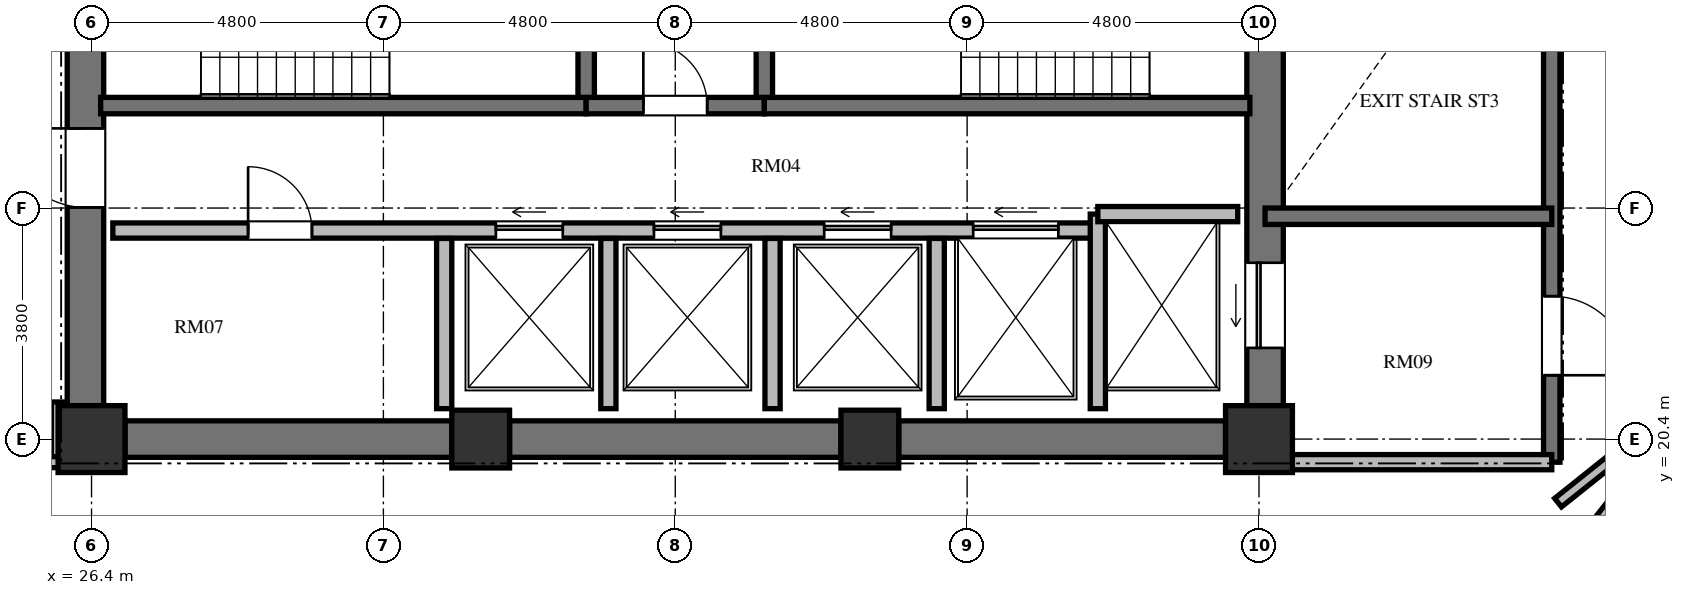
"""IFC4 building model, lengths in metres.
Left out: names, types, materials, properties, quantities, classifications, styles, units other than length and angle.
Written with IfcOpenShell. Run it as: python <this file> out.ifc"""

import sys

from ifc_helpers import new_model, si_unit, direction, frame, frame_2d, origin, origin_2d, place, context, subcontext, project, spatial, rectangle, extrude, element, fill, save


model = new_model("IFC4")
c1 = context("Model", 3, precision=1e-05, world=origin(), true_north=direction((0.0, 1.0)))
c2 = subcontext(c1, "Body", "Model", "MODEL_VIEW")
j1 = project(units=[si_unit("LENGTHUNIT", "METRE"), si_unit("PLANEANGLEUNIT", "RADIAN")], contexts=[c1])
p1 = place(None, origin())
s1 = spatial("IfcSite", under=j1, at=p1, CompositionType="ELEMENT")
p2 = place(p1, origin())
s2 = spatial("IfcBuilding", under=s1, at=p2, CompositionType="ELEMENT")
p3 = place(p2, frame((0.0, 0.0, 174.768)))
s3 = spatial("IfcBuildingStorey", under=s2, at=p3, CompositionType="ELEMENT", Elevation=174.768)
p4 = place(p3, frame((26.4, 20.4, 0.0), z_axis=(0.0, 0.0, 1.0), x_axis=(1.0, 0.0, 0.0)))
e1 = element("IfcColumn", 1, at=p4, inside=s3, PredefinedType="COLUMN", context=c2, shape_type="SweptSolid", body=[
    extrude(rectangle(XDim=1.1, YDim=1.1, at=origin_2d()), origin(), (0.0, 0.0, 1.0), 3.648),
])
for number, where, z_axis, x_axis in (
    (2, (32.8, 20.4, 0.0), (0.0, 0.0, 1.0), (1.0, 0.0, 0.0)),
    (3, (39.2, 20.4, 0.0), (0.0, 0.0, 1.0), (1.0, 0.0, 0.0)),
):
    element("IfcColumn", number, at=place(p3, frame(where, z_axis=z_axis, x_axis=x_axis)), inside=s3, PredefinedType="COLUMN", context=c2, shape_type="SweptSolid", body=[
        extrude(rectangle(XDim=0.95, YDim=0.95, at=origin_2d()), origin(), (0.0, 0.0, 1.0), 3.648),
    ])
p5 = place(p3, frame((45.6, 20.4, 0.0), z_axis=(0.0, 0.0, 1.0), x_axis=(1.0, 0.0, 0.0)))
e4 = element("IfcColumn", 4, at=p5, inside=s3, PredefinedType="COLUMN", context=c2, shape_type="SweptSolid", body=[
    extrude(rectangle(XDim=1.1, YDim=1.1, at=origin_2d()), origin(), (0.0, 0.0, 1.0), 3.648),
])
p6 = place(p3, frame((26.3, 20.95, 0.0), z_axis=(0.0, 0.0, 1.0), x_axis=(0.0, 1.0, 0.0)))
e5 = element("IfcWall", 5, at=p6, inside=s3, PredefinedType="SHEAR", context=c2, shape_type="SweptSolid", body=[
    extrude(rectangle(XDim=14.1, YDim=0.6, at=frame_2d((7.05, 0.0))), origin(), (0.0, 0.0, 1.0), 3.648),
])
p7 = place(p6, frame((6.5, 0.0, 0.0)))
e6 = element("IfcOpeningElement", 6, at=p7, cuts=e5, PredefinedType="OPENING", context=c2, shape_type="SweptSolid", body=[
    extrude(rectangle(XDim=1.2, YDim=2.15, at=frame_2d((0.6, 1.075))), frame((0.0, 0.31, 0.0), z_axis=(0.0, -1.0, 0.0), x_axis=(1.0, 0.0, 0.0)), (0.0, 0.0, 1.0), 0.62),
])
p8 = place(p6, frame((9.6, 0.0, 0.0)))
e7 = element("IfcOpeningElement", 7, at=p8, cuts=e5, PredefinedType="OPENING", context=c2, shape_type="SweptSolid", body=[
    extrude(rectangle(XDim=1.3, YDim=2.2, at=frame_2d((0.65, 1.1))), frame((0.0, 0.31, 0.0), z_axis=(0.0, -1.0, 0.0), x_axis=(1.0, 0.0, 0.0)), (0.0, 0.0, 1.0), 0.62),
])
p9 = place(p6, frame((3.26, 0.0, 0.0)))
e8 = element("IfcOpeningElement", 8, at=p9, cuts=e5, PredefinedType="OPENING", context=c2, shape_type="SweptSolid", body=[
    extrude(rectangle(XDim=1.3, YDim=2.2, at=frame_2d((0.65, 1.1))), frame((0.0, 0.31, 0.0), z_axis=(0.0, -1.0, 0.0), x_axis=(1.0, 0.0, 0.0)), (0.0, 0.0, 1.0), 0.62),
])
p10 = place(p3, frame((45.7, 20.95, 0.0), z_axis=(0.0, 0.0, 1.0), x_axis=(0.0, 1.0, 0.0)))
e9 = element("IfcWall", 9, at=p10, inside=s3, PredefinedType="SHEAR", context=c2, shape_type="SweptSolid", body=[
    extrude(rectangle(XDim=14.1, YDim=0.6, at=frame_2d((7.05, 0.0))), origin(), (0.0, 0.0, 1.0), 3.648),
])
p11 = place(p10, frame((11.75, 0.0, 0.0)))
e10 = element("IfcOpeningElement", 10, at=p11, cuts=e9, PredefinedType="OPENING", context=c2, shape_type="SweptSolid", body=[
    extrude(rectangle(XDim=1.4, YDim=2.3, at=frame_2d((0.7, 1.15))), frame((0.0, 0.31, 0.0), z_axis=(0.0, -1.0, 0.0), x_axis=(1.0, 0.0, 0.0)), (0.0, 0.0, 1.0), 0.62),
])
p12 = place(p10, frame((0.95, 0.0, 0.0)))
e11 = element("IfcOpeningElement", 11, at=p12, cuts=e9, PredefinedType="OPENING", context=c2, shape_type="SweptSolid", body=[
    extrude(rectangle(XDim=1.4, YDim=2.3, at=frame_2d((0.7, 1.15))), frame((0.0, 0.31, 0.0), z_axis=(0.0, -1.0, 0.0), x_axis=(1.0, 0.0, 0.0)), (0.0, 0.0, 1.0), 0.62),
])
p13 = place(p3, frame((26.95, 20.4, 0.0), z_axis=(0.0, 0.0, 1.0), x_axis=(1.0, 0.0, 0.0)))
e12 = element("IfcWall", 12, at=p13, inside=s3, PredefinedType="SHEAR", context=c2, shape_type="SweptSolid", body=[
    extrude(rectangle(XDim=5.375, YDim=0.6, at=frame_2d((2.688, 0.0))), origin(), (0.0, 0.0, 1.0), 3.648),
])
p14 = place(p3, frame((33.275, 20.4, 0.0), z_axis=(0.0, 0.0, 1.0), x_axis=(1.0, 0.0, 0.0)))
e13 = element("IfcWall", 13, at=p14, inside=s3, PredefinedType="SHEAR", context=c2, shape_type="SweptSolid", body=[
    extrude(rectangle(XDim=5.45, YDim=0.6, at=frame_2d((2.725, 0.0))), origin(), (0.0, 0.0, 1.0), 3.648),
])
p15 = place(p3, frame((39.675, 20.4, 0.0), z_axis=(0.0, 0.0, 1.0), x_axis=(1.0, 0.0, 0.0)))
e14 = element("IfcWall", 14, at=p15, inside=s3, PredefinedType="SHEAR", context=c2, shape_type="SweptSolid", body=[
    extrude(rectangle(XDim=5.375, YDim=0.6, at=frame_2d((2.688, 0.0))), origin(), (0.0, 0.0, 1.0), 3.648),
])
p16 = place(p3, frame((26.55, 25.885, 0.0), z_axis=(0.0, 0.0, 1.0), x_axis=(1.0, 0.0, 0.0)))
e15 = element("IfcWall", 15, at=p16, inside=s3, PredefinedType="SHEAR", context=c2, shape_type="SweptSolid", body=[
    extrude(rectangle(XDim=7.985, YDim=0.27, at=frame_2d((3.992, 0.0))), origin(), (0.0, 0.0, 1.0), 3.648),
])
p17 = place(p3, frame((34.535, 25.885, 0.0), z_axis=(0.0, 0.0, 1.0), x_axis=(1.0, 0.0, 0.0)))
e16 = element("IfcWall", 16, at=p17, inside=s3, PredefinedType="SHEAR", context=c2, shape_type="SweptSolid", body=[
    extrude(rectangle(XDim=2.93, YDim=0.27, at=frame_2d((1.465, 0.0))), origin(), (0.0, 0.0, 1.0), 3.648),
])
p18 = place(p17, frame((0.94, 0.0, 0.0)))
e17 = element("IfcOpeningElement", 17, at=p18, cuts=e16, PredefinedType="OPENING", context=c2, shape_type="SweptSolid", body=[
    extrude(rectangle(XDim=1.05, YDim=2.15, at=frame_2d((0.525, 1.075))), frame((0.0, 0.145, 0.0), z_axis=(0.0, -1.0, 0.0), x_axis=(1.0, 0.0, 0.0)), (0.0, 0.0, 1.0), 0.29),
])
p19 = place(p3, frame((37.465, 25.885, 0.0), z_axis=(0.0, 0.0, 1.0), x_axis=(1.0, 0.0, 0.0)))
e18 = element("IfcWall", 18, at=p19, inside=s3, PredefinedType="SHEAR", context=c2, shape_type="SweptSolid", body=[
    extrude(rectangle(XDim=7.985, YDim=0.27, at=frame_2d((3.992, 0.0))), origin(), (0.0, 0.0, 1.0), 3.648),
])
for number, where, z_axis, x_axis in (
    (19, (34.535, 26.02, 0.0), (0.0, 0.0, 1.0), (0.0, 1.0, 0.0)),
    (20, (37.465, 26.02, 0.0), (0.0, 0.0, 1.0), (0.0, 1.0, 0.0)),
):
    element("IfcWall", number, at=place(p3, frame(where, z_axis=z_axis, x_axis=x_axis)), inside=s3, PredefinedType="SHEAR", context=c2, shape_type="SweptSolid", body=[
        extrude(rectangle(XDim=4.08, YDim=0.27, at=frame_2d((2.04, 0.0))), origin(), (0.0, 0.0, 1.0), 3.648),
    ])
p20 = place(p3, frame((26.75, 23.83, 0.0), z_axis=(0.0, 0.0, 1.0), x_axis=(1.0, 0.0, 0.0)))
e21 = element("IfcWall", 21, at=p20, inside=s3, PredefinedType="SOLIDWALL", context=c2, shape_type="SweptSolid", body=[
    extrude(rectangle(XDim=16.2, YDim=0.25, at=frame_2d((8.1, 0.0))), origin(), (0.0, 0.0, 1.0), 3.428),
])
p21 = place(p20, frame((2.225, 0.0, 0.0)))
e22 = element("IfcOpeningElement", 22, at=p21, cuts=e21, PredefinedType="OPENING", context=c2, shape_type="SweptSolid", body=[
    extrude(rectangle(XDim=1.05, YDim=2.15, at=frame_2d((0.525, 1.075))), frame((0.0, 0.135, 0.0), z_axis=(0.0, -1.0, 0.0), x_axis=(1.0, 0.0, 0.0)), (0.0, 0.0, 1.0), 0.27),
])
p22 = place(p20, frame((6.3, 0.0, 0.0)))
e23 = element("IfcOpeningElement", 23, at=p22, cuts=e21, PredefinedType="OPENING", context=c2, shape_type="SweptSolid", body=[
    extrude(rectangle(XDim=1.1, YDim=2.2, at=frame_2d((0.55, 1.1))), frame((0.0, 0.135, 0.0), z_axis=(0.0, -1.0, 0.0), x_axis=(1.0, 0.0, 0.0)), (0.0, 0.0, 1.0), 0.27),
])
p23 = place(p20, frame((8.9, 0.0, 0.0)))
e24 = element("IfcOpeningElement", 24, at=p23, cuts=e21, PredefinedType="OPENING", context=c2, shape_type="SweptSolid", body=[
    extrude(rectangle(XDim=1.1, YDim=2.2, at=frame_2d((0.55, 1.1))), frame((0.0, 0.135, 0.0), z_axis=(0.0, -1.0, 0.0), x_axis=(1.0, 0.0, 0.0)), (0.0, 0.0, 1.0), 0.27),
])
p24 = place(p20, frame((11.7, 0.0, 0.0)))
e25 = element("IfcOpeningElement", 25, at=p24, cuts=e21, PredefinedType="OPENING", context=c2, shape_type="SweptSolid", body=[
    extrude(rectangle(XDim=1.1, YDim=2.2, at=frame_2d((0.55, 1.1))), frame((0.0, 0.135, 0.0), z_axis=(0.0, -1.0, 0.0), x_axis=(1.0, 0.0, 0.0)), (0.0, 0.0, 1.0), 0.27),
])
p25 = place(p20, frame((14.15, 0.0, 0.0)))
e26 = element("IfcOpeningElement", 26, at=p25, cuts=e21, PredefinedType="OPENING", context=c2, shape_type="SweptSolid", body=[
    extrude(rectangle(XDim=1.4, YDim=2.3, at=frame_2d((0.7, 1.15))), frame((0.0, 0.135, 0.0), z_axis=(0.0, -1.0, 0.0), x_axis=(1.0, 0.0, 0.0)), (0.0, 0.0, 1.0), 0.27),
])
p26 = place(p3, frame((42.95, 20.9, 0.0), z_axis=(0.0, 0.0, 1.0), x_axis=(0.0, 1.0, 0.0)))
e27 = element("IfcWall", 27, at=p26, inside=s3, PredefinedType="SOLIDWALL", context=c2, shape_type="SweptSolid", body=[
    extrude(rectangle(XDim=3.2, YDim=0.25, at=frame_2d((1.6, 0.0))), origin(), (0.0, 0.0, 1.0), 3.428),
])
p27 = place(p3, frame((42.95, 24.1, 0.0), z_axis=(0.0, 0.0, 1.0), x_axis=(1.0, 0.0, 0.0)))
e28 = element("IfcWall", 28, at=p27, inside=s3, PredefinedType="SOLIDWALL", context=c2, shape_type="SweptSolid", body=[
    extrude(rectangle(XDim=2.3, YDim=0.25, at=frame_2d((1.15, 0.0))), origin(), (0.0, 0.0, 1.0), 3.428),
])
for number, where, z_axis, x_axis in (
    (29, (32.2, 20.9, 0.0), (0.0, 0.0, 1.0), (0.0, 1.0, 0.0)),
    (30, (34.9, 20.9, 0.0), (0.0, 0.0, 1.0), (0.0, 1.0, 0.0)),
    (31, (37.6, 20.9, 0.0), (0.0, 0.0, 1.0), (0.0, 1.0, 0.0)),
    (32, (40.3, 20.9, 0.0), (0.0, 0.0, 1.0), (0.0, 1.0, 0.0)),
):
    element("IfcWall", number, at=place(p3, frame(where, z_axis=z_axis, x_axis=x_axis)), inside=s3, PredefinedType="SOLIDWALL", context=c2, shape_type="SweptSolid", body=[
        extrude(rectangle(XDim=2.8, YDim=0.25, at=frame_2d((1.4, 0.0))), origin(), (0.0, 0.0, 1.0), 3.428),
    ])
p28 = place(p3, frame((50.415, 35.845, 0.0), z_axis=(0.0, 0.0, 1.0), x_axis=(0.0, -1.0, 0.0)))
e33 = element("IfcWall", 33, at=p28, inside=s3, PredefinedType="SHEAR", context=c2, shape_type="SweptSolid", body=[
    extrude(rectangle(XDim=15.825, YDim=0.27, at=frame_2d((7.913, 0.0))), origin(), (0.0, 0.0, 1.0), 3.648),
])
p29 = place(p28, frame((4.445, 0.0, 0.0)))
e34 = element("IfcOpeningElement", 34, at=p29, cuts=e33, PredefinedType="OPENING", context=c2, shape_type="SweptSolid", body=[
    extrude(rectangle(XDim=1.2, YDim=2.15, at=frame_2d((0.6, 1.075))), frame((0.0, 0.145, 0.0), z_axis=(0.0, -1.0, 0.0), x_axis=(1.0, 0.0, 0.0)), (0.0, 0.0, 1.0), 0.29),
])
p30 = place(p28, frame((1.295, 0.0, 0.0)))
e35 = element("IfcOpeningElement", 35, at=p30, cuts=e33, PredefinedType="OPENING", context=c2, shape_type="SweptSolid", body=[
    extrude(rectangle(XDim=1.3, YDim=2.2, at=frame_2d((0.65, 1.1))), frame((0.0, 0.145, 0.0), z_axis=(0.0, -1.0, 0.0), x_axis=(1.0, 0.0, 0.0)), (0.0, 0.0, 1.0), 0.29),
])
p31 = place(p28, frame((13.095, 0.0, 0.0)))
e36 = element("IfcOpeningElement", 36, at=p31, cuts=e33, PredefinedType="OPENING", context=c2, shape_type="SweptSolid", body=[
    extrude(rectangle(XDim=1.3, YDim=2.2, at=frame_2d((0.65, 1.1))), frame((0.0, 0.145, 0.0), z_axis=(0.0, -1.0, 0.0), x_axis=(1.0, 0.0, 0.0)), (0.0, 0.0, 1.0), 0.29),
])
p32 = place(p3, frame((45.7, 24.065, 0.0), z_axis=(0.0, 0.0, 1.0), x_axis=(1.0, 0.0, 0.0)))
e37 = element("IfcWall", 37, at=p32, inside=s3, PredefinedType="SHEAR", context=c2, shape_type="SweptSolid", body=[
    extrude(rectangle(XDim=4.715, YDim=0.27, at=frame_2d((2.357, 0.0))), origin(), (0.0, 0.0, 1.0), 3.648),
])
p33 = place(p3, frame((45.7, 20.02, 0.0), z_axis=(0.0, 0.0, 1.0), x_axis=(1.0, 0.0, 0.0)))
e38 = element("IfcWall", 38, at=p33, inside=s3, PredefinedType="SOLIDWALL", context=c2, shape_type="SweptSolid", body=[
    extrude(rectangle(XDim=4.715, YDim=0.25, at=frame_2d((2.357, 0.0))), origin(), (0.0, 0.0, 1.0), 3.428),
])
p34 = place(p3, frame((53.181, 21.481, 0.0), z_axis=(0.0, 0.0, 1.0), x_axis=(-0.781420737726, -0.624004511724, 0.0)))
e39 = element("IfcWall", 39, at=p34, inside=s3, PredefinedType="PARTITIONING", context=c2, shape_type="SweptSolid", body=[
    extrude(rectangle(XDim=3.407, YDim=0.18, at=frame_2d((1.704, 0.0))), origin(), (0.0, 0.0, 1.0), 3.428),
])
p35 = place(p3, frame((25.83, 21.01, 0.0), z_axis=(0.0, 0.0, 1.0), x_axis=(0.0, -1.0, 0.0)))
e40 = element("IfcWall", 40, at=p35, inside=s3, PredefinedType="PARTITIONING", context=c2, shape_type="SweptSolid", body=[
    extrude(rectangle(XDim=1.03, YDim=0.18, at=frame_2d((0.515, 0.0))), origin(), (0.0, 0.0, 1.0), 3.428),
])
p36 = place(p3, frame((25.87, 20.02, 0.0), z_axis=(0.0, 0.0, 1.0), x_axis=(-1.0, 0.0, 0.0)))
e41 = element("IfcWall", 41, at=p36, inside=s3, PredefinedType="PARTITIONING", context=c2, shape_type="SweptSolid", body=[
    extrude(rectangle(XDim=2.56, YDim=0.18, at=frame_2d((1.28, 0.0))), origin(), (0.0, 0.0, 1.0), 3.428),
])
p37 = place(p36, frame((0.58, 0.0, 0.0)))
e42 = element("IfcOpeningElement", 42, at=p37, cuts=e41, PredefinedType="OPENING", context=c2, shape_type="SweptSolid", body=[
    extrude(rectangle(XDim=1.4, YDim=2.2, at=frame_2d((0.7, 1.1))), frame((0.0, 0.1, 0.0), z_axis=(0.0, -1.0, 0.0), x_axis=(1.0, 0.0, 0.0)), (0.0, 0.0, 1.0), 0.2),
])
p38 = place(p3, frame((52.537, 20.783, 0.0), z_axis=(0.0, 0.0, 1.0), x_axis=(-0.617570357244, -0.786515641201, 0.0)))
e43 = element("IfcWall", 43, at=p38, inside=s3, PredefinedType="PARTITIONING", context=c2, shape_type="SweptSolid", body=[
    extrude(rectangle(XDim=6.74, YDim=0.15, at=frame_2d((3.37, 0.0))), origin(), (0.0, 0.0, 1.0), 2.863),
])
p39 = place(p18, origin())
e44 = element("IfcDoor", 44, at=p39, inside=s3, OperationType="SINGLE_SWING_LEFT", PredefinedType="DOOR", context=c2, shape_type="SweptSolid", body=[
    extrude(rectangle(XDim=1.05, YDim=2.15, at=frame_2d((0.525, 1.075))), frame((0.0, 0.025, 0.0), z_axis=(0.0, -1.0, 0.0), x_axis=(1.0, 0.0, 0.0)), (0.0, 0.0, 1.0), 0.05),
])
fill(e17, e44)
p40 = place(p9, origin())
e45 = element("IfcDoor", 45, at=p40, inside=s3, OperationType="SINGLE_SWING_RIGHT", PredefinedType="DOOR", context=c2, shape_type="SweptSolid", body=[
    extrude(rectangle(XDim=1.3, YDim=2.2, at=frame_2d((0.65, 1.1))), frame((0.0, 0.025, 0.0), z_axis=(0.0, -1.0, 0.0), x_axis=(1.0, 0.0, 0.0)), (0.0, 0.0, 1.0), 0.05),
])
fill(e8, e45)
p41 = place(p21, origin())
e46 = element("IfcDoor", 46, at=p41, inside=s3, OperationType="SINGLE_SWING_LEFT", PredefinedType="DOOR", context=c2, shape_type="SweptSolid", body=[
    extrude(rectangle(XDim=1.05, YDim=2.15, at=frame_2d((0.525, 1.075))), frame((0.0, 0.025, 0.0), z_axis=(0.0, -1.0, 0.0), x_axis=(1.0, 0.0, 0.0)), (0.0, 0.0, 1.0), 0.05),
])
fill(e22, e46)
p42 = place(p22, origin())
e47 = element("IfcDoor", 47, at=p42, inside=s3, OperationType="SLIDING_TO_LEFT", PredefinedType="DOOR", context=c2, shape_type="SweptSolid", body=[
    extrude(rectangle(XDim=1.1, YDim=2.2, at=frame_2d((0.55, 1.1))), frame((0.0, 0.025, 0.0), z_axis=(0.0, -1.0, 0.0), x_axis=(1.0, 0.0, 0.0)), (0.0, 0.0, 1.0), 0.05),
])
fill(e23, e47)
p43 = place(p23, origin())
e48 = element("IfcDoor", 48, at=p43, inside=s3, OperationType="SLIDING_TO_LEFT", PredefinedType="DOOR", context=c2, shape_type="SweptSolid", body=[
    extrude(rectangle(XDim=1.1, YDim=2.2, at=frame_2d((0.55, 1.1))), frame((0.0, 0.025, 0.0), z_axis=(0.0, -1.0, 0.0), x_axis=(1.0, 0.0, 0.0)), (0.0, 0.0, 1.0), 0.05),
])
fill(e24, e48)
p44 = place(p24, origin())
e49 = element("IfcDoor", 49, at=p44, inside=s3, OperationType="SLIDING_TO_LEFT", PredefinedType="DOOR", context=c2, shape_type="SweptSolid", body=[
    extrude(rectangle(XDim=1.1, YDim=2.2, at=frame_2d((0.55, 1.1))), frame((0.0, 0.025, 0.0), z_axis=(0.0, -1.0, 0.0), x_axis=(1.0, 0.0, 0.0)), (0.0, 0.0, 1.0), 0.05),
])
fill(e25, e49)
p45 = place(p12, origin())
e50 = element("IfcDoor", 50, at=p45, inside=s3, OperationType="SLIDING_TO_LEFT", PredefinedType="DOOR", context=c2, shape_type="SweptSolid", body=[
    extrude(rectangle(XDim=1.4, YDim=2.3, at=frame_2d((0.7, 1.15))), frame((0.0, 0.025, 0.0), z_axis=(0.0, -1.0, 0.0), x_axis=(1.0, 0.0, 0.0)), (0.0, 0.0, 1.0), 0.05),
])
fill(e11, e50)
p46 = place(p25, origin())
e51 = element("IfcDoor", 51, at=p46, inside=s3, OperationType="SLIDING_TO_LEFT", PredefinedType="DOOR", context=c2, shape_type="SweptSolid", body=[
    extrude(rectangle(XDim=1.4, YDim=2.3, at=frame_2d((0.7, 1.15))), frame((0.0, 0.025, 0.0), z_axis=(0.0, -1.0, 0.0), x_axis=(1.0, 0.0, 0.0)), (0.0, 0.0, 1.0), 0.05),
])
fill(e26, e51)
p47 = place(p31, origin())
e52 = element("IfcDoor", 52, at=p47, inside=s3, OperationType="SINGLE_SWING_RIGHT", PredefinedType="DOOR", context=c2, shape_type="SweptSolid", body=[
    extrude(rectangle(XDim=1.3, YDim=2.2, at=frame_2d((0.65, 1.1))), frame((0.0, 0.025, 0.0), z_axis=(0.0, -1.0, 0.0), x_axis=(1.0, 0.0, 0.0)), (0.0, 0.0, 1.0), 0.05),
])
fill(e36, e52)
save(model, sys.argv[1])
